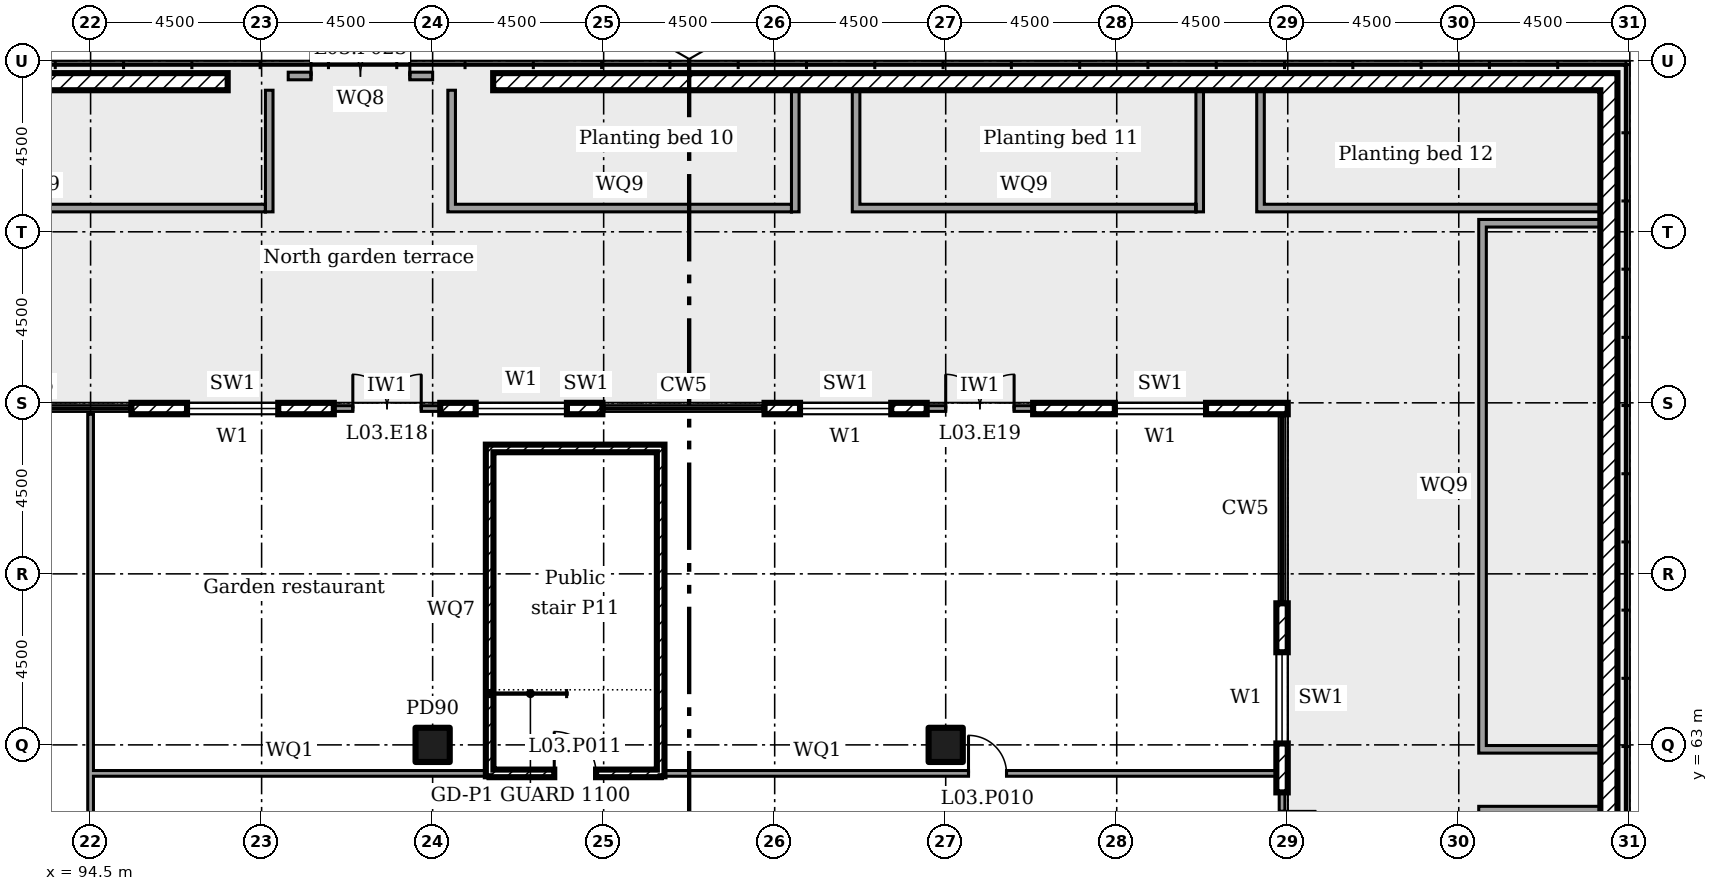
"""IFC4 building model, lengths in metres.
Left out: names, types, materials, properties, quantities, classifications, styles, units other than length and angle.
Written with IfcOpenShell. Run it as: python <this file> out.ifc"""

import sys

from ifc_helpers import new_model, si_unit, direction, frame, frame_2d, origin, origin_2d, place, context, subcontext, project, spatial, rectangle, extrude, element, fill, save


model = new_model("IFC4")
c1 = context("Model", 3, precision=1e-05, world=origin(), true_north=direction((0.0, 1.0)))
c2 = subcontext(c1, "Body", "Model", "MODEL_VIEW")
j1 = project(units=[si_unit("LENGTHUNIT", "METRE"), si_unit("PLANEANGLEUNIT", "RADIAN")], contexts=[c1])
p1 = place(None, origin())
s1 = spatial("IfcSite", under=j1, at=p1, CompositionType="ELEMENT")
p2 = place(p1, origin())
s2 = spatial("IfcBuilding", under=s1, at=p2, CompositionType="ELEMENT")
p3 = place(p2, frame((0.0, 0.0, 16.5)))
s3 = spatial("IfcBuildingStorey", under=s2, at=p3, CompositionType="ELEMENT", Elevation=16.5)
for number, where in (
    (1, (103.5, 63.0, 0.0)),
    (2, (117.0, 63.0, 0.0)),
):
    element("IfcColumn", number, at=place(p3, frame(where)), inside=s3, PredefinedType="COLUMN", context=c2, shape_type="SweptSolid", body=[
        extrude(rectangle(XDim=0.9, YDim=0.9, at=origin_2d()), origin(), (0.0, 0.0, 1.0), 4.5),
    ])
p4 = place(p3, frame((125.85, 58.95, 0.0), z_axis=(0.0, 0.0, 1.0), x_axis=(0.0, 1.0, 0.0)))
e3 = element("IfcWall", 3, at=p4, inside=s3, PredefinedType="SOLIDWALL", context=c2, shape_type="SweptSolid", body=[
    extrude(rectangle(XDim=2.8, YDim=0.15, at=frame_2d((1.4, 0.0))), origin(), (0.0, 0.0, 1.0), 4.05),
])
p5 = place(p4, frame((0.5, 0.0, 0.0)))
e4 = element("IfcOpeningElement", 4, at=p5, cuts=e3, PredefinedType="OPENING", context=c2, shape_type="SweptSolid", body=[
    extrude(rectangle(XDim=1.8, YDim=2.4, at=frame_2d((0.9, 1.2))), frame((0.0, 0.085, 0.0), z_axis=(0.0, -1.0, 0.0), x_axis=(1.0, 0.0, 0.0)), (0.0, 0.0, 1.0), 0.17),
])
p6 = place(p3, frame((125.85, 61.75, 0.0), z_axis=(0.0, 0.0, 1.0), x_axis=(0.0, 1.0, 0.0)))
e5 = element("IfcWall", 5, at=p6, inside=s3, PredefinedType="ELEMENTEDWALL", context=c2, shape_type="SweptSolid", body=[
    extrude(rectangle(XDim=4.975, YDim=0.3, at=frame_2d((2.488, 0.0))), origin(), (0.0, 0.0, 1.0), 4.05),
])
p7 = place(p6, frame((1.288, 0.0, 0.45)))
e6 = element("IfcOpeningElement", 6, at=p7, cuts=e5, PredefinedType="OPENING", context=c2, shape_type="SweptSolid", body=[
    extrude(rectangle(XDim=2.4, YDim=2.4, at=frame_2d((1.2, 1.2))), frame((0.0, 0.16, 0.0), z_axis=(0.0, -1.0, 0.0), x_axis=(1.0, 0.0, 0.0)), (0.0, 0.0, 1.0), 0.32),
])
p8 = place(p3, frame((126.0, 71.85, 0.0), z_axis=(0.0, 0.0, 1.0), x_axis=(-1.0, 0.0, 0.0)))
e7 = element("IfcWall", 7, at=p8, inside=s3, PredefinedType="ELEMENTEDWALL", context=c2, shape_type="SweptSolid", body=[
    extrude(rectangle(XDim=6.7, YDim=0.3, at=frame_2d((3.35, 0.0))), origin(), (0.0, 0.0, 1.0), 4.05),
])
p9 = place(p8, frame((2.15, 0.0, 0.45)))
e8 = element("IfcOpeningElement", 8, at=p9, cuts=e7, PredefinedType="OPENING", context=c2, shape_type="SweptSolid", body=[
    extrude(rectangle(XDim=2.4, YDim=2.4, at=frame_2d((1.2, 1.2))), frame((0.0, 0.16, 0.0), z_axis=(0.0, -1.0, 0.0), x_axis=(1.0, 0.0, 0.0)), (0.0, 0.0, 1.0), 0.32),
])
p10 = place(p3, frame((119.3, 71.85, 0.0), z_axis=(0.0, 0.0, 1.0), x_axis=(-1.0, 0.0, 0.0)))
e9 = element("IfcWall", 9, at=p10, inside=s3, PredefinedType="SOLIDWALL", context=c2, shape_type="SweptSolid", body=[
    extrude(rectangle(XDim=2.8, YDim=0.15, at=frame_2d((1.4, 0.0))), origin(), (0.0, 0.0, 1.0), 4.05),
])
p11 = place(p10, frame((0.5, 0.0, 0.0)))
e10 = element("IfcOpeningElement", 10, at=p11, cuts=e9, PredefinedType="OPENING", context=c2, shape_type="SweptSolid", body=[
    extrude(rectangle(XDim=1.8, YDim=2.4, at=frame_2d((0.9, 1.2))), frame((0.0, 0.085, 0.0), z_axis=(0.0, -1.0, 0.0), x_axis=(1.0, 0.0, 0.0)), (0.0, 0.0, 1.0), 0.17),
])
p12 = place(p3, frame((116.5, 71.85, 0.0), z_axis=(0.0, 0.0, 1.0), x_axis=(-1.0, 0.0, 0.0)))
e11 = element("IfcWall", 11, at=p12, inside=s3, PredefinedType="ELEMENTEDWALL", context=c2, shape_type="SweptSolid", body=[
    extrude(rectangle(XDim=4.267, YDim=0.3, at=frame_2d((2.133, 0.0))), origin(), (0.0, 0.0, 1.0), 4.05),
])
p13 = place(p12, frame((0.933, 0.0, 0.45)))
e12 = element("IfcOpeningElement", 12, at=p13, cuts=e11, PredefinedType="OPENING", context=c2, shape_type="SweptSolid", body=[
    extrude(rectangle(XDim=2.4, YDim=2.4, at=frame_2d((1.2, 1.2))), frame((0.0, 0.16, 0.0), z_axis=(0.0, -1.0, 0.0), x_axis=(1.0, 0.0, 0.0)), (0.0, 0.0, 1.0), 0.32),
])
p14 = place(p3, frame((107.967, 71.85, 0.0), z_axis=(0.0, 0.0, 1.0), x_axis=(-1.0, 0.0, 0.0)))
e13 = element("IfcWall", 13, at=p14, inside=s3, PredefinedType="ELEMENTEDWALL", context=c2, shape_type="SweptSolid", body=[
    extrude(rectangle(XDim=4.267, YDim=0.3, at=frame_2d((2.133, 0.0))), origin(), (0.0, 0.0, 1.0), 4.05),
])
p15 = place(p14, frame((0.933, 0.0, 0.45)))
e14 = element("IfcOpeningElement", 14, at=p15, cuts=e13, PredefinedType="OPENING", context=c2, shape_type="SweptSolid", body=[
    extrude(rectangle(XDim=2.4, YDim=2.4, at=frame_2d((1.2, 1.2))), frame((0.0, 0.16, 0.0), z_axis=(0.0, -1.0, 0.0), x_axis=(1.0, 0.0, 0.0)), (0.0, 0.0, 1.0), 0.32),
])
p16 = place(p3, frame((103.7, 71.85, 0.0), z_axis=(0.0, 0.0, 1.0), x_axis=(-1.0, 0.0, 0.0)))
e15 = element("IfcWall", 15, at=p16, inside=s3, PredefinedType="SOLIDWALL", context=c2, shape_type="SweptSolid", body=[
    extrude(rectangle(XDim=2.8, YDim=0.15, at=frame_2d((1.4, 0.0))), origin(), (0.0, 0.0, 1.0), 4.05),
])
p17 = place(p16, frame((0.5, 0.0, 0.0)))
e16 = element("IfcOpeningElement", 16, at=p17, cuts=e15, PredefinedType="OPENING", context=c2, shape_type="SweptSolid", body=[
    extrude(rectangle(XDim=1.8, YDim=2.4, at=frame_2d((0.9, 1.2))), frame((0.0, 0.085, 0.0), z_axis=(0.0, -1.0, 0.0), x_axis=(1.0, 0.0, 0.0)), (0.0, 0.0, 1.0), 0.17),
])
p18 = place(p3, frame((100.9, 71.85, 0.0), z_axis=(0.0, 0.0, 1.0), x_axis=(-1.0, 0.0, 0.0)))
e17 = element("IfcWall", 17, at=p18, inside=s3, PredefinedType="ELEMENTEDWALL", context=c2, shape_type="SweptSolid", body=[
    extrude(rectangle(XDim=5.325, YDim=0.3, at=frame_2d((2.663, 0.0))), origin(), (0.0, 0.0, 1.0), 4.05),
])
p19 = place(p18, frame((1.462, 0.0, 0.45)))
e18 = element("IfcOpeningElement", 18, at=p19, cuts=e17, PredefinedType="OPENING", context=c2, shape_type="SweptSolid", body=[
    extrude(rectangle(XDim=2.4, YDim=2.4, at=frame_2d((1.2, 1.2))), frame((0.0, 0.16, 0.0), z_axis=(0.0, -1.0, 0.0), x_axis=(1.0, 0.0, 0.0)), (0.0, 0.0, 1.0), 0.32),
])
p20 = place(p3, frame((134.45, 33.093, 0.0), z_axis=(0.0, 0.0, 1.0), x_axis=(0.0, 1.0, 0.0)))
e19 = element("IfcWall", 19, at=p20, inside=s3, PredefinedType="SOLIDWALL", context=c2, shape_type="SweptSolid", body=[
    extrude(rectangle(XDim=47.583, YDim=0.45, at=frame_2d((23.791, 0.0))), origin(), (0.0, 0.0, 1.0), 0.6),
])
p21 = place(p3, frame((134.225, 80.45, 0.0), z_axis=(0.0, 0.0, 1.0), x_axis=(-1.0, 0.0, 0.0)))
e20 = element("IfcWall", 20, at=p21, inside=s3, PredefinedType="SOLIDWALL", context=c2, shape_type="SweptSolid", body=[
    extrude(rectangle(XDim=29.133, YDim=0.45, at=frame_2d((14.566, 0.0))), origin(), (0.0, 0.0, 1.0), 0.6),
])
p22 = place(p3, frame((98.107, 80.45, 0.0), z_axis=(0.0, 0.0, 1.0), x_axis=(-1.0, 0.0, 0.0)))
e21 = element("IfcWall", 21, at=p22, inside=s3, PredefinedType="SOLIDWALL", context=c2, shape_type="SweptSolid", body=[
    extrude(rectangle(XDim=79.782, YDim=0.45, at=frame_2d((39.891, 0.0))), origin(), (0.0, 0.0, 1.0), 0.6),
])
p23 = place(p3, frame((113.042, 77.025, 0.0), z_axis=(0.0, 0.0, 1.0), x_axis=(0.0, 1.0, 0.0)))
e22 = element("IfcWall", 22, at=p23, inside=s3, PredefinedType="SOLIDWALL", context=c2, shape_type="SweptSolid", body=[
    extrude(rectangle(XDim=3.2, YDim=0.2, at=frame_2d((1.6, 0.0))), origin(), (0.0, 0.0, 1.0), 0.45),
])
p24 = place(p3, frame((103.9, 77.125, 0.0)))
e23 = element("IfcWall", 23, at=p24, inside=s3, PredefinedType="SOLIDWALL", context=c2, shape_type="SweptSolid", body=[
    extrude(rectangle(XDim=9.042, YDim=0.2, at=frame_2d((4.521, 0.0))), origin(), (0.0, 0.0, 1.0), 0.45),
])
p25 = place(p3, frame((104.0, 77.225, 0.0), z_axis=(0.0, 0.0, 1.0), x_axis=(0.0, 1.0, 0.0)))
e24 = element("IfcWall", 24, at=p25, inside=s3, PredefinedType="SOLIDWALL", context=c2, shape_type="SweptSolid", body=[
    extrude(rectangle(XDim=3.0, YDim=0.2, at=frame_2d((1.5, 0.0))), origin(), (0.0, 0.0, 1.0), 0.45),
])
p26 = place(p3, frame((123.683, 77.025, 0.0), z_axis=(0.0, 0.0, 1.0), x_axis=(0.0, 1.0, 0.0)))
e25 = element("IfcWall", 25, at=p26, inside=s3, PredefinedType="SOLIDWALL", context=c2, shape_type="SweptSolid", body=[
    extrude(rectangle(XDim=3.2, YDim=0.2, at=frame_2d((1.6, 0.0))), origin(), (0.0, 0.0, 1.0), 0.45),
])
p27 = place(p3, frame((114.542, 77.125, 0.0)))
e26 = element("IfcWall", 26, at=p27, inside=s3, PredefinedType="SOLIDWALL", context=c2, shape_type="SweptSolid", body=[
    extrude(rectangle(XDim=9.042, YDim=0.2, at=frame_2d((4.521, 0.0))), origin(), (0.0, 0.0, 1.0), 0.45),
])
p28 = place(p3, frame((114.642, 77.225, 0.0), z_axis=(0.0, 0.0, 1.0), x_axis=(0.0, 1.0, 0.0)))
e27 = element("IfcWall", 27, at=p28, inside=s3, PredefinedType="SOLIDWALL", context=c2, shape_type="SweptSolid", body=[
    extrude(rectangle(XDim=3.0, YDim=0.2, at=frame_2d((1.5, 0.0))), origin(), (0.0, 0.0, 1.0), 0.45),
])
p29 = place(p3, frame((125.183, 77.125, 0.0)))
e28 = element("IfcWall", 28, at=p29, inside=s3, PredefinedType="SOLIDWALL", context=c2, shape_type="SweptSolid", body=[
    extrude(rectangle(XDim=9.042, YDim=0.2, at=frame_2d((4.521, 0.0))), origin(), (0.0, 0.0, 1.0), 0.45),
])
p30 = place(p3, frame((125.283, 77.225, 0.0), z_axis=(0.0, 0.0, 1.0), x_axis=(0.0, 1.0, 0.0)))
e29 = element("IfcWall", 29, at=p30, inside=s3, PredefinedType="SOLIDWALL", context=c2, shape_type="SweptSolid", body=[
    extrude(rectangle(XDim=3.0, YDim=0.2, at=frame_2d((1.5, 0.0))), origin(), (0.0, 0.0, 1.0), 0.45),
])
p31 = place(p3, frame((99.2, 77.025, 0.0), z_axis=(0.0, 0.0, 1.0), x_axis=(0.0, 1.0, 0.0)))
e30 = element("IfcWall", 30, at=p31, inside=s3, PredefinedType="SOLIDWALL", context=c2, shape_type="SweptSolid", body=[
    extrude(rectangle(XDim=3.2, YDim=0.2, at=frame_2d((1.6, 0.0))), origin(), (0.0, 0.0, 1.0), 0.45),
])
p32 = place(p3, frame((87.012, 77.125, 0.0)))
e31 = element("IfcWall", 31, at=p32, inside=s3, PredefinedType="SOLIDWALL", context=c2, shape_type="SweptSolid", body=[
    extrude(rectangle(XDim=12.088, YDim=0.2, at=frame_2d((6.044, 0.0))), origin(), (0.0, 0.0, 1.0), 0.45),
])
for number, where in (
    (32, (131.025, 61.283, 0.0)),
    (33, (131.025, 76.725, 0.0)),
    (34, (131.025, 62.883, 0.0)),
):
    element("IfcWall", number, at=place(p3, frame(where)), inside=s3, PredefinedType="SOLIDWALL", context=c2, shape_type="SweptSolid", body=[
        extrude(rectangle(XDim=3.2, YDim=0.2, at=frame_2d((1.6, 0.0))), origin(), (0.0, 0.0, 1.0), 0.45),
    ])
p33 = place(p3, frame((131.125, 62.983, 0.0), z_axis=(0.0, 0.0, 1.0), x_axis=(0.0, 1.0, 0.0)))
e35 = element("IfcWall", 35, at=p33, inside=s3, PredefinedType="SOLIDWALL", context=c2, shape_type="SweptSolid", body=[
    extrude(rectangle(XDim=13.642, YDim=0.2, at=frame_2d((6.821, 0.0))), origin(), (0.0, 0.0, 1.0), 0.45),
])
p34 = place(p3, frame((94.5, 58.5, 0.0), z_axis=(0.0, 0.0, 1.0), x_axis=(0.0, 1.0, 0.0)))
e36 = element("IfcWall", 36, at=p34, inside=s3, PredefinedType="PARTITIONING", context=c2, shape_type="SweptSolid", body=[
    extrude(rectangle(XDim=3.825, YDim=0.15, at=frame_2d((1.913, 0.0))), origin(), (0.0, 0.0, 1.0), 4.05),
])
p35 = place(p34, frame((1.25, 0.0, 0.0)))
e37 = element("IfcOpeningElement", 37, at=p35, cuts=e36, PredefinedType="OPENING", context=c2, shape_type="SweptSolid", body=[
    extrude(rectangle(XDim=1.2, YDim=2.1, at=frame_2d((0.6, 1.05))), frame((0.0, 0.085, 0.0), z_axis=(0.0, -1.0, 0.0), x_axis=(1.0, 0.0, 0.0)), (0.0, 0.0, 1.0), 0.17),
])
p36 = place(p3, frame((94.5, 62.25, 0.0), z_axis=(0.0, 0.0, 1.0), x_axis=(0.0, 1.0, 0.0)))
e38 = element("IfcWall", 38, at=p36, inside=s3, PredefinedType="PARTITIONING", context=c2, shape_type="SweptSolid", body=[
    extrude(rectangle(XDim=9.45, YDim=0.15, at=frame_2d((4.725, 0.0))), origin(), (0.0, 0.0, 1.0), 4.05),
])
p37 = place(p3, frame((94.575, 62.25, 0.0)))
e39 = element("IfcWall", 39, at=p37, inside=s3, PredefinedType="PARTITIONING", context=c2, shape_type="SweptSolid", body=[
    extrude(rectangle(XDim=10.325, YDim=0.15, at=frame_2d((5.163, 0.0))), origin(), (0.0, 0.0, 1.0), 4.05),
])
p38 = place(p3, frame((109.6, 62.25, 0.0)))
e40 = element("IfcWall", 40, at=p38, inside=s3, PredefinedType="PARTITIONING", context=c2, shape_type="SweptSolid", body=[
    extrude(rectangle(XDim=16.1, YDim=0.15, at=frame_2d((8.05, 0.0))), origin(), (0.0, 0.0, 1.0), 4.05),
])
p39 = place(p38, frame((8.0, 0.0, 0.0)))
e41 = element("IfcOpeningElement", 41, at=p39, cuts=e40, PredefinedType="OPENING", context=c2, shape_type="SweptSolid", body=[
    extrude(rectangle(XDim=1.0, YDim=2.1, at=frame_2d((0.5, 1.05))), frame((0.0, 0.085, 0.0), z_axis=(0.0, -1.0, 0.0), x_axis=(1.0, 0.0, 0.0)), (0.0, 0.0, 1.0), 0.17),
])
p40 = place(p3, frame((105.0, 62.25, 0.0)))
e42 = element("IfcWall", 42, at=p40, inside=s3, PredefinedType="SOLIDWALL", context=c2, shape_type="SweptSolid", body=[
    extrude(rectangle(XDim=4.5, YDim=0.2, at=frame_2d((2.25, 0.0))), origin(), (0.0, 0.0, 1.0), 4.05),
])
p41 = place(p40, frame((1.7, 0.0, 0.0)))
e43 = element("IfcOpeningElement", 43, at=p41, cuts=e42, PredefinedType="OPENING", context=c2, shape_type="SweptSolid", body=[
    extrude(rectangle(XDim=1.1, YDim=2.1, at=frame_2d((0.55, 1.05))), frame((0.0, 0.11, 0.0), z_axis=(0.0, -1.0, 0.0), x_axis=(1.0, 0.0, 0.0)), (0.0, 0.0, 1.0), 0.22),
])
for number, where, z_axis, x_axis in (
    (44, (105.0, 62.175, 0.0), (0.0, 0.0, 1.0), (0.0, 1.0, 0.0)),
    (45, (109.5, 62.175, 0.0), (0.0, 0.0, 1.0), (0.0, 1.0, 0.0)),
):
    element("IfcWall", number, at=place(p3, frame(where, z_axis=z_axis, x_axis=x_axis)), inside=s3, PredefinedType="SOLIDWALL", context=c2, shape_type="SweptSolid", body=[
        extrude(rectangle(XDim=8.725, YDim=0.2, at=frame_2d((4.362, 0.0))), origin(), (0.0, 0.0, 1.0), 4.05),
    ])
p42 = place(p3, frame((105.1, 70.8, 0.0)))
e46 = element("IfcWall", 46, at=p42, inside=s3, PredefinedType="SOLIDWALL", context=c2, shape_type="SweptSolid", body=[
    extrude(rectangle(XDim=4.3, YDim=0.2, at=frame_2d((2.15, 0.0))), origin(), (0.0, 0.0, 1.0), 4.05),
])
p43 = place(p3, frame((99.7, 80.6, 0.0)))
e47 = element("IfcWall", 47, at=p43, inside=s3, PredefinedType="SOLIDWALL", context=c2, shape_type="SweptSolid", body=[
    extrude(rectangle(XDim=3.8, YDim=0.2, at=frame_2d((1.9, 0.0))), origin(), (0.0, 0.0, 1.0), 2.3),
])
p44 = place(p43, frame((0.6, 0.0, 0.0)))
e48 = element("IfcOpeningElement", 48, at=p44, cuts=e47, PredefinedType="OPENING", context=c2, shape_type="SweptSolid", body=[
    extrude(rectangle(XDim=2.6, YDim=2.1, at=frame_2d((1.3, 1.05))), frame((0.0, 0.11, 0.0), z_axis=(0.0, -1.0, 0.0), x_axis=(1.0, 0.0, 0.0)), (0.0, 0.0, 1.0), 0.22),
])
p45 = place(p5, frame((1.8, 0.0, 0.0), x_axis=(-1.0, 0.0, 0.0)))
e49 = element("IfcDoor", 49, at=p45, inside=s3, OperationType="DOUBLE_DOOR_DOUBLE_SWING", PredefinedType="NOTDEFINED", context=c2, shape_type="SweptSolid", body=[
    extrude(rectangle(XDim=1.8, YDim=2.4, at=frame_2d((0.9, 1.2))), frame((0.0, 0.025, 0.0), z_axis=(0.0, -1.0, 0.0), x_axis=(1.0, 0.0, 0.0)), (0.0, 0.0, 1.0), 0.05),
])
fill(e4, e49)
p46 = place(p7, origin())
e50 = element("IfcWindow", 50, at=p46, inside=s3, PartitioningType="SINGLE_PANEL", PredefinedType="WINDOW", context=c2, shape_type="SweptSolid", body=[
    extrude(rectangle(XDim=2.4, YDim=2.4, at=frame_2d((1.2, 1.2))), frame((0.0, 0.03, 0.0), z_axis=(0.0, -1.0, 0.0), x_axis=(1.0, 0.0, 0.0)), (0.0, 0.0, 1.0), 0.06),
])
fill(e6, e50)
p47 = place(p9, origin())
e51 = element("IfcWindow", 51, at=p47, inside=s3, PartitioningType="SINGLE_PANEL", PredefinedType="WINDOW", context=c2, shape_type="SweptSolid", body=[
    extrude(rectangle(XDim=2.4, YDim=2.4, at=frame_2d((1.2, 1.2))), frame((0.0, 0.03, 0.0), z_axis=(0.0, -1.0, 0.0), x_axis=(1.0, 0.0, 0.0)), (0.0, 0.0, 1.0), 0.06),
])
fill(e8, e51)
p48 = place(p11, frame((1.8, 0.0, 0.0), x_axis=(-1.0, 0.0, 0.0)))
e52 = element("IfcDoor", 52, at=p48, inside=s3, OperationType="DOUBLE_DOOR_DOUBLE_SWING", PredefinedType="NOTDEFINED", context=c2, shape_type="SweptSolid", body=[
    extrude(rectangle(XDim=1.8, YDim=2.4, at=frame_2d((0.9, 1.2))), frame((0.0, 0.025, 0.0), z_axis=(0.0, -1.0, 0.0), x_axis=(1.0, 0.0, 0.0)), (0.0, 0.0, 1.0), 0.05),
])
fill(e10, e52)
p49 = place(p13, origin())
e53 = element("IfcWindow", 53, at=p49, inside=s3, PartitioningType="SINGLE_PANEL", PredefinedType="WINDOW", context=c2, shape_type="SweptSolid", body=[
    extrude(rectangle(XDim=2.4, YDim=2.4, at=frame_2d((1.2, 1.2))), frame((0.0, 0.03, 0.0), z_axis=(0.0, -1.0, 0.0), x_axis=(1.0, 0.0, 0.0)), (0.0, 0.0, 1.0), 0.06),
])
fill(e12, e53)
p50 = place(p15, origin())
e54 = element("IfcWindow", 54, at=p50, inside=s3, PartitioningType="SINGLE_PANEL", PredefinedType="WINDOW", context=c2, shape_type="SweptSolid", body=[
    extrude(rectangle(XDim=2.4, YDim=2.4, at=frame_2d((1.2, 1.2))), frame((0.0, 0.03, 0.0), z_axis=(0.0, -1.0, 0.0), x_axis=(1.0, 0.0, 0.0)), (0.0, 0.0, 1.0), 0.06),
])
fill(e14, e54)
p51 = place(p17, frame((1.8, 0.0, 0.0), x_axis=(-1.0, 0.0, 0.0)))
e55 = element("IfcDoor", 55, at=p51, inside=s3, OperationType="DOUBLE_DOOR_DOUBLE_SWING", PredefinedType="NOTDEFINED", context=c2, shape_type="SweptSolid", body=[
    extrude(rectangle(XDim=1.8, YDim=2.4, at=frame_2d((0.9, 1.2))), frame((0.0, 0.025, 0.0), z_axis=(0.0, -1.0, 0.0), x_axis=(1.0, 0.0, 0.0)), (0.0, 0.0, 1.0), 0.05),
])
fill(e16, e55)
p52 = place(p19, origin())
e56 = element("IfcWindow", 56, at=p52, inside=s3, PartitioningType="SINGLE_PANEL", PredefinedType="WINDOW", context=c2, shape_type="SweptSolid", body=[
    extrude(rectangle(XDim=2.4, YDim=2.4, at=frame_2d((1.2, 1.2))), frame((0.0, 0.03, 0.0), z_axis=(0.0, -1.0, 0.0), x_axis=(1.0, 0.0, 0.0)), (0.0, 0.0, 1.0), 0.06),
])
fill(e18, e56)
p53 = place(p39, origin())
e57 = element("IfcDoor", 57, at=p53, inside=s3, OperationType="SINGLE_SWING_RIGHT", PredefinedType="DOOR", context=c2, shape_type="SweptSolid", body=[
    extrude(rectangle(XDim=1.0, YDim=2.1, at=frame_2d((0.5, 1.05))), frame((0.0, 0.025, 0.0), z_axis=(0.0, -1.0, 0.0), x_axis=(1.0, 0.0, 0.0)), (0.0, 0.0, 1.0), 0.05),
])
fill(e41, e57)
p54 = place(p41, origin())
e58 = element("IfcDoor", 58, at=p54, inside=s3, OperationType="SINGLE_SWING_RIGHT", PredefinedType="DOOR", context=c2, shape_type="SweptSolid", body=[
    extrude(rectangle(XDim=1.1, YDim=2.1, at=frame_2d((0.55, 1.05))), frame((0.0, 0.025, 0.0), z_axis=(0.0, -1.0, 0.0), x_axis=(1.0, 0.0, 0.0)), (0.0, 0.0, 1.0), 0.05),
])
fill(e43, e58)
p55 = place(p44, origin())
e59 = element("IfcDoor", 59, at=p55, inside=s3, OperationType="DOUBLE_DOOR_SINGLE_SWING", PredefinedType="GATE", context=c2, shape_type="SweptSolid", body=[
    extrude(rectangle(XDim=2.6, YDim=2.1, at=frame_2d((1.3, 1.05))), frame((0.0, 0.025, 0.0), z_axis=(0.0, -1.0, 0.0), x_axis=(1.0, 0.0, 0.0)), (0.0, 0.0, 1.0), 0.05),
])
fill(e48, e59)
save(model, sys.argv[1])
